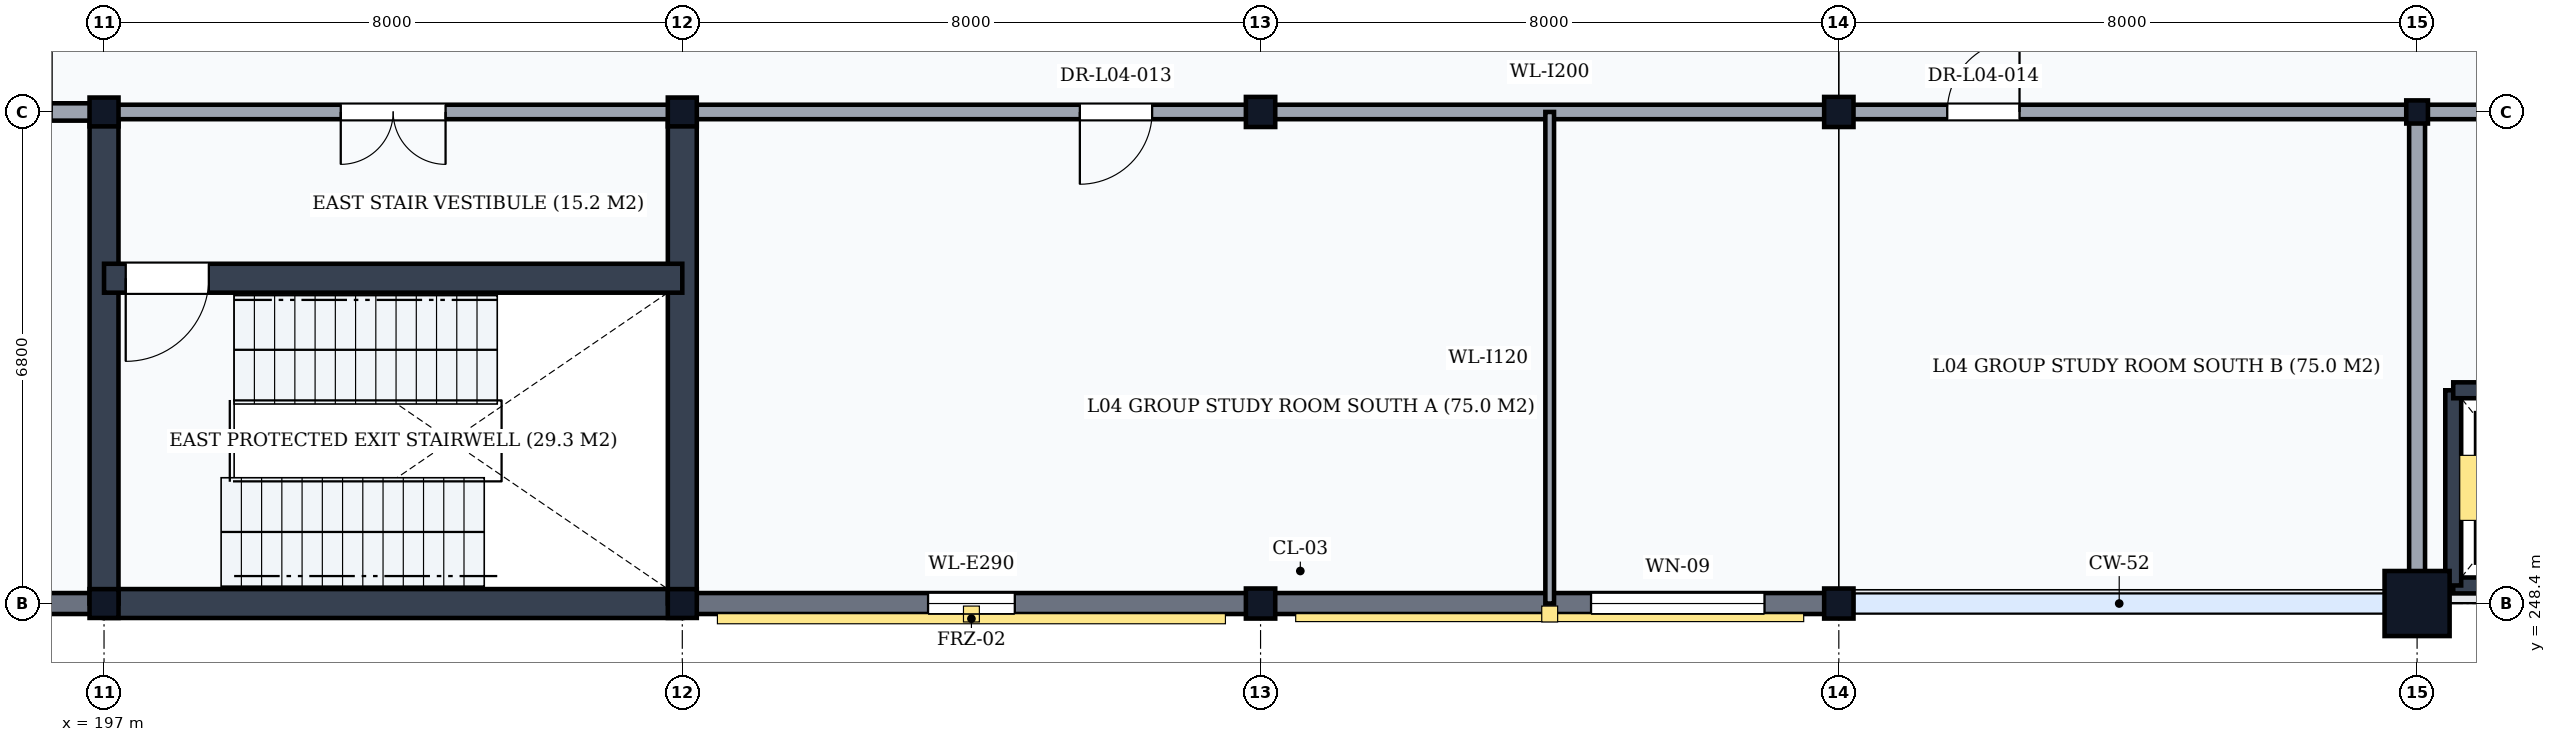
"""IFC4 building model, lengths in metres.
Left out: names, types, materials, properties, quantities, classifications, styles, units other than length and angle.
Written with IfcOpenShell. Run it as: python <this file> out.ifc"""

import sys

from ifc_helpers import new_model, si_unit, direction, frame, frame_2d, origin, origin_2d, place, context, subcontext, project, spatial, rectangle, circle, i_section, extrude, element, fill, save


model = new_model("IFC4")
c1 = context("Model", 3, precision=1e-05, world=origin(), true_north=direction((0.0, 1.0)))
c2 = subcontext(c1, "Body", "Model", "MODEL_VIEW")
j1 = project(units=[si_unit("LENGTHUNIT", "METRE"), si_unit("PLANEANGLEUNIT", "RADIAN")], contexts=[c1])
p1 = place(None, origin())
s1 = spatial("IfcSite", under=j1, at=p1, CompositionType="ELEMENT")
p2 = place(p1, origin())
s2 = spatial("IfcBuilding", under=s1, at=p2, CompositionType="ELEMENT")
p3 = place(p2, frame((0.0, 0.0, 15.6)))
s3 = spatial("IfcBuildingStorey", under=s2, at=p3, CompositionType="ELEMENT", Elevation=15.6)
for number, where, z_axis, x_axis in (
    (1, (197.0, 248.4, 0.0), (0.0, 0.0, 1.0), (1.0, 0.0, 0.0)),
    (2, (197.0, 255.2, 0.0), (0.0, 0.0, 1.0), (1.0, 0.0, 0.0)),
    (3, (205.0, 248.4, 0.0), (0.0, 0.0, 1.0), (1.0, 0.0, 0.0)),
    (4, (205.0, 255.2, 0.0), (0.0, 0.0, 1.0), (1.0, 0.0, 0.0)),
):
    element("IfcColumn", number, at=place(p3, frame(where, z_axis=z_axis, x_axis=x_axis)), inside=s3, PredefinedType="COLUMN", context=c2, shape_type="SweptSolid", body=[
        extrude(i_section(OverallWidth=0.401, OverallDepth=0.399, WebThickness=0.025, FlangeThickness=0.04, FilletRadius=0.015, at=origin_2d()), origin(), (0.0, 0.0, 1.0), 4.8),
    ])
for number, where, z_axis, x_axis in (
    (5, (213.0, 248.4, 0.0), (0.0, 0.0, 1.0), (1.0, 0.0, 0.0)),
    (6, (213.0, 255.2, 0.0), (0.0, 0.0, 1.0), (1.0, 0.0, 0.0)),
    (7, (221.0, 248.4, 0.0), (0.0, 0.0, 1.0), (1.0, 0.0, 0.0)),
    (8, (221.0, 255.2, 0.0), (0.0, 0.0, 1.0), (1.0, 0.0, 0.0)),
):
    element("IfcColumn", number, at=place(p3, frame(where, z_axis=z_axis, x_axis=x_axis)), inside=s3, PredefinedType="COLUMN", context=c2, shape_type="SweptSolid", body=[
        extrude(i_section(OverallWidth=0.406, OverallDepth=0.416, WebThickness=0.03, FlangeThickness=0.048, FilletRadius=0.015, at=origin_2d()), origin(), (0.0, 0.0, 1.0), 4.8),
    ])
p4 = place(p3, frame((229.0, 248.4, 0.0), z_axis=(0.0, 0.0, 1.0), x_axis=(1.0, 0.0, 0.0)))
e9 = element("IfcColumn", 9, at=p4, inside=s3, PredefinedType="COLUMN", context=c2, shape_type="SweptSolid", body=[
    extrude(circle(Radius=0.45, at=origin_2d()), origin(), (0.0, 0.0, 1.0), 4.8),
])
p5 = place(p3, frame((229.0, 255.2, 0.0), z_axis=(0.0, 0.0, 1.0), x_axis=(1.0, 0.0, 0.0)))
e10 = element("IfcColumn", 10, at=p5, inside=s3, PredefinedType="COLUMN", context=c2, shape_type="SweptSolid", body=[
    extrude(i_section(OverallWidth=0.3, OverallDepth=0.32, WebThickness=0.011, FlangeThickness=0.021, FilletRadius=0.027, at=origin_2d()), origin(), (0.0, 0.0, 1.0), 4.8),
])
p6 = place(p3, frame((189.006, 248.4, 0.0), z_axis=(0.0, 0.0, 1.0), x_axis=(1.0, 0.0, 0.0)))
e11 = element("IfcWall", 11, at=p6, inside=s3, PredefinedType="SOLIDWALL", context=c2, shape_type="SweptSolid", body=[
    extrude(rectangle(XDim=7.988, YDim=0.29, at=frame_2d((3.994, 0.0))), origin(), (0.0, 0.0, 1.0), 4.168),
])
p7 = place(p3, frame((205.006, 248.4, 0.0), z_axis=(0.0, 0.0, 1.0), x_axis=(1.0, 0.0, 0.0)))
e12 = element("IfcWall", 12, at=p7, inside=s3, PredefinedType="SOLIDWALL", context=c2, shape_type="SweptSolid", body=[
    extrude(rectangle(XDim=7.988, YDim=0.29, at=frame_2d((3.994, 0.0))), origin(), (0.0, 0.0, 1.0), 4.168),
])
p8 = place(p7, frame((3.394, 0.0, 0.95)))
e13 = element("IfcOpeningElement", 13, at=p8, cuts=e12, PredefinedType="OPENING", context=c2, shape_type="SweptSolid", body=[
    extrude(rectangle(XDim=1.2, YDim=1.8, at=frame_2d((0.6, 0.9))), frame((0.0, 0.16, 0.0), z_axis=(0.0, -1.0, 0.0), x_axis=(1.0, 0.0, 0.0)), (0.0, 0.0, 1.0), 0.32),
])
p9 = place(p3, frame((213.006, 248.4, 0.0), z_axis=(0.0, 0.0, 1.0), x_axis=(1.0, 0.0, 0.0)))
e14 = element("IfcWall", 14, at=p9, inside=s3, PredefinedType="SOLIDWALL", context=c2, shape_type="SweptSolid", body=[
    extrude(rectangle(XDim=7.988, YDim=0.29, at=frame_2d((3.994, 0.0))), origin(), (0.0, 0.0, 1.0), 4.168),
])
p10 = place(p9, frame((4.566, 0.0, 0.95)))
e15 = element("IfcOpeningElement", 15, at=p10, cuts=e14, PredefinedType="OPENING", context=c2, shape_type="SweptSolid", body=[
    extrude(rectangle(XDim=2.4, YDim=2.2, at=frame_2d((1.2, 1.1))), frame((0.0, 0.16, 0.0), z_axis=(0.0, -1.0, 0.0), x_axis=(1.0, 0.0, 0.0)), (0.0, 0.0, 1.0), 0.32),
])
p11 = place(p3, frame((221.1, 248.5, 4.8), z_axis=(0.0, 0.0, 1.0), x_axis=(1.0, 0.0, 0.0)))
e16 = element("IfcWall", 16, at=p11, inside=s3, PredefinedType="PARAPET", context=c2, shape_type="SweptSolid", body=[
    extrude(rectangle(XDim=42.8, YDim=0.18, at=frame_2d((21.4, 0.0))), origin(), (0.0, 0.0, 1.0), 1.2),
])
p12 = place(p3, frame((197.0, 248.4, 0.0), z_axis=(0.0, 0.0, 1.0), x_axis=(1.0, 0.0, 0.0)))
e17 = element("IfcWall", 17, at=p12, inside=s3, PredefinedType="SHEAR", context=c2, shape_type="SweptSolid", body=[
    extrude(rectangle(XDim=8.0, YDim=0.4, at=frame_2d((4.0, 0.0))), origin(), (0.0, 0.0, 1.0), 4.48),
])
for number, where, z_axis, x_axis in (
    (18, (197.0, 248.4, 0.0), (0.0, 0.0, 1.0), (0.0, 1.0, 0.0)),
    (19, (205.0, 248.4, 0.0), (0.0, 0.0, 1.0), (0.0, 1.0, 0.0)),
):
    element("IfcWall", number, at=place(p3, frame(where, z_axis=z_axis, x_axis=x_axis)), inside=s3, PredefinedType="SHEAR", context=c2, shape_type="SweptSolid", body=[
        extrude(rectangle(XDim=6.8, YDim=0.4, at=frame_2d((3.4, 0.0))), origin(), (0.0, 0.0, 1.0), 4.48),
    ])
p13 = place(p3, frame((197.0, 252.9, 0.0), z_axis=(0.0, 0.0, 1.0), x_axis=(1.0, 0.0, 0.0)))
e20 = element("IfcWall", 20, at=p13, inside=s3, PredefinedType="SHEAR", context=c2, shape_type="SweptSolid", body=[
    extrude(rectangle(XDim=8.0, YDim=0.4, at=frame_2d((4.0, 0.0))), origin(), (0.0, 0.0, 1.0), 4.48),
])
p14 = place(p13, frame((0.3, 0.0, 0.0)))
e21 = element("IfcOpeningElement", 21, at=p14, cuts=e20, PredefinedType="OPENING", context=c2, shape_type="SweptSolid", body=[
    extrude(rectangle(XDim=1.15, YDim=2.15, at=frame_2d((0.575, 1.075))), frame((0.0, 0.215, 0.0), z_axis=(0.0, -1.0, 0.0), x_axis=(1.0, 0.0, 0.0)), (0.0, 0.0, 1.0), 0.43),
])
p15 = place(p3, frame((197.0, 255.2, 0.0), z_axis=(0.0, 0.0, 1.0), x_axis=(1.0, 0.0, 0.0)))
e22 = element("IfcWall", 22, at=p15, inside=s3, PredefinedType="PARTITIONING", context=c2, shape_type="SweptSolid", body=[
    extrude(rectangle(XDim=8.0, YDim=0.2, at=frame_2d((4.0, 0.0))), origin(), (0.0, 0.0, 1.0), 3.928),
])
p16 = place(p15, frame((3.275, 0.0, 0.0)))
e23 = element("IfcOpeningElement", 23, at=p16, cuts=e22, PredefinedType="OPENING", context=c2, shape_type="SweptSolid", body=[
    extrude(rectangle(XDim=1.45, YDim=2.2, at=frame_2d((0.725, 1.1))), frame((0.0, 0.115, 0.0), z_axis=(0.0, -1.0, 0.0), x_axis=(1.0, 0.0, 0.0)), (0.0, 0.0, 1.0), 0.23),
])
p17 = place(p3, frame((229.5, 248.65, 0.0), z_axis=(0.0, 0.0, 1.0), x_axis=(1.0, 0.0, 0.0)))
e24 = element("IfcWall", 24, at=p17, inside=s3, PredefinedType="SHEAR", context=c2, shape_type="SweptSolid", body=[
    extrude(rectangle(XDim=2.2, YDim=0.22, at=frame_2d((1.1, 0.0))), origin(), (0.0, 0.0, 1.0), 4.55),
])
p18 = place(p3, frame((229.5, 248.65, 0.0), z_axis=(0.0, 0.0, 1.0), x_axis=(0.0, 1.0, 0.0)))
e25 = element("IfcWall", 25, at=p18, inside=s3, PredefinedType="SHEAR", context=c2, shape_type="SweptSolid", body=[
    extrude(rectangle(XDim=2.7, YDim=0.22, at=frame_2d((1.35, 0.0))), origin(), (0.0, 0.0, 1.0), 4.55),
])
p19 = place(p3, frame((229.5, 251.35, 0.0), z_axis=(0.0, 0.0, 1.0), x_axis=(1.0, 0.0, 0.0)))
e26 = element("IfcWall", 26, at=p19, inside=s3, PredefinedType="SHEAR", context=c2, shape_type="SweptSolid", body=[
    extrude(rectangle(XDim=2.2, YDim=0.22, at=frame_2d((1.1, 0.0))), origin(), (0.0, 0.0, 1.0), 4.55),
])
p20 = place(p19, frame((0.5, 0.0, 0.0)))
e27 = element("IfcOpeningElement", 27, at=p20, cuts=e26, PredefinedType="OPENING", context=c2, shape_type="SweptSolid", body=[
    extrude(rectangle(XDim=1.2, YDim=2.2, at=frame_2d((0.6, 1.1))), frame((0.0, 0.125, 0.0), z_axis=(0.0, -1.0, 0.0), x_axis=(1.0, 0.0, 0.0)), (0.0, 0.0, 1.0), 0.25),
])
p21 = place(p3, frame((189.0, 255.2, 0.0), z_axis=(0.0, 0.0, 1.0), x_axis=(1.0, 0.0, 0.0)))
e28 = element("IfcWall", 28, at=p21, inside=s3, PredefinedType="PARTITIONING", context=c2, shape_type="SweptSolid", body=[
    extrude(rectangle(XDim=8.0, YDim=0.24, at=frame_2d((4.0, 0.0))), origin(), (0.0, 0.0, 1.0), 3.928),
])
p22 = place(p21, frame((1.05, 0.0, 0.0)))
e29 = element("IfcOpeningElement", 29, at=p22, cuts=e28, PredefinedType="OPENING", context=c2, shape_type="SweptSolid", body=[
    extrude(rectangle(XDim=1.0, YDim=2.1, at=frame_2d((0.5, 1.05))), frame((0.0, 0.135, 0.0), z_axis=(0.0, -1.0, 0.0), x_axis=(1.0, 0.0, 0.0)), (0.0, 0.0, 1.0), 0.27),
])
p23 = place(p21, frame((3.6, 0.0, 0.0)))
e30 = element("IfcOpeningElement", 30, at=p23, cuts=e28, PredefinedType="OPENING", context=c2, shape_type="SweptSolid", body=[
    extrude(rectangle(XDim=1.5, YDim=2.25, at=frame_2d((0.75, 1.125))), frame((0.0, 0.135, 0.0), z_axis=(0.0, -1.0, 0.0), x_axis=(1.0, 0.0, 0.0)), (0.0, 0.0, 1.0), 0.27),
])
p24 = place(p21, frame((6.425, 0.0, 0.0)))
e31 = element("IfcOpeningElement", 31, at=p24, cuts=e28, PredefinedType="OPENING", context=c2, shape_type="SweptSolid", body=[
    extrude(rectangle(XDim=0.85, YDim=2.1, at=frame_2d((0.425, 1.05))), frame((0.0, 0.135, 0.0), z_axis=(0.0, -1.0, 0.0), x_axis=(1.0, 0.0, 0.0)), (0.0, 0.0, 1.0), 0.27),
])
p25 = place(p3, frame((229.0, 248.4, 0.0), z_axis=(0.0, 0.0, 1.0), x_axis=(0.0, 1.0, 0.0)))
e32 = element("IfcWall", 32, at=p25, inside=s3, PredefinedType="PARTITIONING", context=c2, shape_type="SweptSolid", body=[
    extrude(rectangle(XDim=6.8, YDim=0.22, at=frame_2d((3.4, 0.0))), origin(), (0.0, 0.0, 1.0), 3.998),
])
p26 = place(p3, frame((229.0, 255.2, 0.0), z_axis=(0.0, 0.0, 1.0), x_axis=(1.0, 0.0, 0.0)))
e33 = element("IfcWall", 33, at=p26, inside=s3, PredefinedType="PARTITIONING", context=c2, shape_type="SweptSolid", body=[
    extrude(rectangle(XDim=8.0, YDim=0.2, at=frame_2d((4.0, 0.0))), origin(), (0.0, 0.0, 1.0), 3.998),
])
p27 = place(p26, frame((3.1, 0.0, 0.0)))
e34 = element("IfcOpeningElement", 34, at=p27, cuts=e33, PredefinedType="OPENING", context=c2, shape_type="SweptSolid", body=[
    extrude(rectangle(XDim=1.8, YDim=2.4, at=frame_2d((0.9, 1.2))), frame((0.0, 0.115, 0.0), z_axis=(0.0, -1.0, 0.0), x_axis=(1.0, 0.0, 0.0)), (0.0, 0.0, 1.0), 0.23),
])
p28 = place(p3, frame((205.0, 255.2, 0.0), z_axis=(0.0, 0.0, 1.0), x_axis=(1.0, 0.0, 0.0)))
e35 = element("IfcWall", 35, at=p28, inside=s3, PredefinedType="PARTITIONING", context=c2, shape_type="SweptSolid", body=[
    extrude(rectangle(XDim=24.0, YDim=0.2, at=frame_2d((12.0, 0.0))), origin(), (0.0, 0.0, 1.0), 3.928),
])
p29 = place(p28, frame((5.5, 0.0, 0.0)))
e36 = element("IfcOpeningElement", 36, at=p29, cuts=e35, PredefinedType="OPENING", context=c2, shape_type="SweptSolid", body=[
    extrude(rectangle(XDim=1.0, YDim=2.1, at=frame_2d((0.5, 1.05))), frame((0.0, 0.115, 0.0), z_axis=(0.0, -1.0, 0.0), x_axis=(1.0, 0.0, 0.0)), (0.0, 0.0, 1.0), 0.23),
])
p30 = place(p28, frame((17.5, 0.0, 0.0)))
e37 = element("IfcOpeningElement", 37, at=p30, cuts=e35, PredefinedType="OPENING", context=c2, shape_type="SweptSolid", body=[
    extrude(rectangle(XDim=1.0, YDim=2.1, at=frame_2d((0.5, 1.05))), frame((0.0, 0.115, 0.0), z_axis=(0.0, -1.0, 0.0), x_axis=(1.0, 0.0, 0.0)), (0.0, 0.0, 1.0), 0.23),
])
p31 = place(p3, frame((217.0, 248.4, 0.0), z_axis=(0.0, 0.0, 1.0), x_axis=(0.0, 1.0, 0.0)))
e38 = element("IfcWall", 38, at=p31, inside=s3, PredefinedType="PARTITIONING", context=c2, shape_type="SweptSolid", body=[
    extrude(rectangle(XDim=6.8, YDim=0.12, at=frame_2d((3.4, 0.0))), origin(), (0.0, 0.0, 1.0), 4.178),
])
p32 = place(p8, origin())
e39 = element("IfcWindow", 39, at=p32, inside=s3, PartitioningType="SINGLE_PANEL", PredefinedType="WINDOW", context=c2, shape_type="SweptSolid", body=[
    extrude(rectangle(XDim=1.2, YDim=1.8, at=frame_2d((0.6, 0.9))), frame((0.0, 0.03, 0.0), z_axis=(0.0, -1.0, 0.0), x_axis=(1.0, 0.0, 0.0)), (0.0, 0.0, 1.0), 0.06),
])
fill(e13, e39)
p33 = place(p10, origin())
e40 = element("IfcWindow", 40, at=p33, inside=s3, PartitioningType="DOUBLE_PANEL_VERTICAL", PredefinedType="WINDOW", context=c2, shape_type="SweptSolid", body=[
    extrude(rectangle(XDim=2.4, YDim=2.2, at=frame_2d((1.2, 1.1))), frame((0.0, 0.03, 0.0), z_axis=(0.0, -1.0, 0.0), x_axis=(1.0, 0.0, 0.0)), (0.0, 0.0, 1.0), 0.06),
])
fill(e15, e40)
p34 = place(p14, frame((1.15, 0.0, 0.0), z_axis=(0.0, 0.0, 1.0), x_axis=(-1.0, 0.0, 0.0)))
e41 = element("IfcDoor", 41, at=p34, inside=s3, OperationType="SINGLE_SWING_RIGHT", PredefinedType="DOOR", context=c2, shape_type="SweptSolid", body=[
    extrude(rectangle(XDim=1.15, YDim=2.15, at=frame_2d((0.575, 1.075))), frame((0.0, 0.025, 0.0), z_axis=(0.0, -1.0, 0.0), x_axis=(1.0, 0.0, 0.0)), (0.0, 0.0, 1.0), 0.05),
])
fill(e21, e41)
p35 = place(p16, frame((1.45, 0.0, 0.0), z_axis=(0.0, 0.0, 1.0), x_axis=(-1.0, 0.0, 0.0)))
e42 = element("IfcDoor", 42, at=p35, inside=s3, OperationType="DOUBLE_DOOR_SINGLE_SWING", PredefinedType="DOOR", context=c2, shape_type="SweptSolid", body=[
    extrude(rectangle(XDim=1.45, YDim=2.2, at=frame_2d((0.725, 1.1))), frame((0.0, 0.025, 0.0), z_axis=(0.0, -1.0, 0.0), x_axis=(1.0, 0.0, 0.0)), (0.0, 0.0, 1.0), 0.05),
])
fill(e23, e42)
p36 = place(p29, frame((1.0, 0.0, 0.0), z_axis=(0.0, 0.0, 1.0), x_axis=(-1.0, 0.0, 0.0)))
e43 = element("IfcDoor", 43, at=p36, inside=s3, OperationType="SINGLE_SWING_RIGHT", PredefinedType="DOOR", context=c2, shape_type="SweptSolid", body=[
    extrude(rectangle(XDim=1.0, YDim=2.1, at=frame_2d((0.5, 1.05))), frame((0.0, 0.025, 0.0), z_axis=(0.0, -1.0, 0.0), x_axis=(1.0, 0.0, 0.0)), (0.0, 0.0, 1.0), 0.05),
])
fill(e36, e43)
p37 = place(p30, frame((1.0, 0.0, 0.0), z_axis=(0.0, 0.0, 1.0), x_axis=(-1.0, 0.0, 0.0)))
e44 = element("IfcDoor", 44, at=p37, inside=s3, OperationType="SINGLE_SWING_LEFT", PredefinedType="DOOR", context=c2, shape_type="SweptSolid", body=[
    extrude(rectangle(XDim=1.0, YDim=2.1, at=frame_2d((0.5, 1.05))), frame((0.0, 0.025, 0.0), z_axis=(0.0, -1.0, 0.0), x_axis=(1.0, 0.0, 0.0)), (0.0, 0.0, 1.0), 0.05),
])
fill(e37, e44)
save(model, sys.argv[1])
